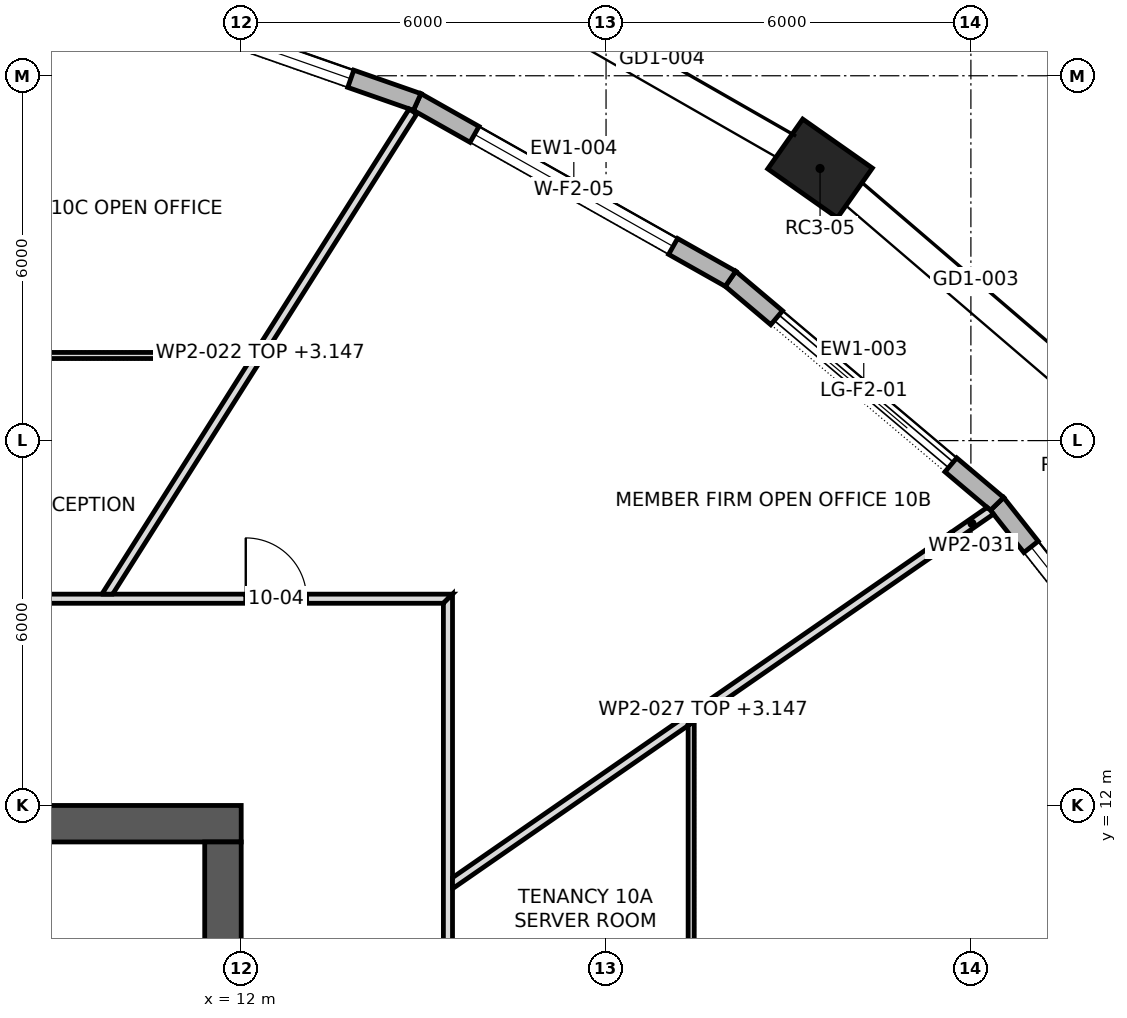
"""IFC4 building model, lengths in metres.
Left out: names, types, materials, properties, quantities, classifications, styles, units other than length and angle.
Written with IfcOpenShell. Run it as: python <this file> out.ifc"""

import sys

from ifc_helpers import new_model, si_unit, direction, frame, frame_2d, origin, origin_2d, place, context, subcontext, project, spatial, polyline, rectangle, outline, extrude, element, fill, save


model = new_model("IFC4")
c1 = context("Model", 3, precision=1e-05, world=origin(), true_north=direction((0.0, 1.0)))
c2 = subcontext(c1, "Body", "Model", "MODEL_VIEW")
j1 = project(units=[si_unit("LENGTHUNIT", "METRE"), si_unit("PLANEANGLEUNIT", "RADIAN")], contexts=[c1])
p1 = place(None, origin())
s1 = spatial("IfcSite", under=j1, at=p1, CompositionType="ELEMENT")
p2 = place(p1, origin())
s2 = spatial("IfcBuilding", under=s1, at=p2, CompositionType="ELEMENT")
p3 = place(p2, frame((0.0, 0.0, 150.7)))
s3 = spatial("IfcBuildingStorey", under=s2, at=p3, CompositionType="ELEMENT", Elevation=150.7)
p4 = place(p3, frame((21.519, 22.475, 0.0), z_axis=(0.0, 0.0, 1.0), x_axis=(-0.817910796357, 0.575345052297, 0.0)))
e1 = element("IfcColumn", 1, at=p4, inside=s3, PredefinedType="COLUMN", context=c2, shape_type="SweptSolid", body=[
    extrude(rectangle(XDim=1.4, YDim=1.0, at=origin_2d()), origin(), (0.0, 0.0, 1.0), 4.2),
])
p5 = place(p3, frame((-12.0, 11.7, 0.0), z_axis=(0.0, 0.0, 1.0), x_axis=(1.0, 0.0, 0.0)))
e2 = element("IfcWall", 2, at=p5, inside=s3, PredefinedType="SHEAR", context=c2, shape_type="SweptSolid", body=[
    extrude(rectangle(XDim=24.0, YDim=0.6, at=frame_2d((12.0, 0.0))), origin(), (0.0, 0.0, 1.0), 4.2),
])
p6 = place(p5, frame((9.225, 0.0, 0.0)))
e3 = element("IfcOpeningElement", 3, at=p6, cuts=e2, PredefinedType="OPENING", context=c2, shape_type="SweptSolid", body=[
    extrude(rectangle(XDim=0.9, YDim=2.1, at=frame_2d((0.45, 1.05))), frame((0.0, 0.312, 0.0), z_axis=(0.0, -1.0, 0.0), x_axis=(1.0, 0.0, 0.0)), (0.0, 0.0, 1.0), 0.624),
])
p7 = place(p5, frame((10.925, 0.0, 0.0)))
e4 = element("IfcOpeningElement", 4, at=p7, cuts=e2, PredefinedType="OPENING", context=c2, shape_type="SweptSolid", body=[
    extrude(rectangle(XDim=0.8, YDim=2.1, at=frame_2d((0.4, 1.05))), frame((0.0, 0.312, 0.0), z_axis=(0.0, -1.0, 0.0), x_axis=(1.0, 0.0, 0.0)), (0.0, 0.0, 1.0), 0.624),
])
p8 = place(p5, frame((4.2, 0.0, 0.0)))
e5 = element("IfcOpeningElement", 5, at=p8, cuts=e2, PredefinedType="OPENING", context=c2, shape_type="SweptSolid", body=[
    extrude(rectangle(XDim=0.8, YDim=2.1, at=frame_2d((0.4, 1.05))), frame((0.0, 0.312, 0.0), z_axis=(0.0, -1.0, 0.0), x_axis=(1.0, 0.0, 0.0)), (0.0, 0.0, 1.0), 0.624),
])
p9 = place(p5, frame((13.8, 0.0, 0.0)))
e6 = element("IfcOpeningElement", 6, at=p9, cuts=e2, PredefinedType="OPENING", context=c2, shape_type="SweptSolid", body=[
    extrude(rectangle(XDim=0.8, YDim=2.1, at=frame_2d((0.4, 1.05))), frame((0.0, 0.312, 0.0), z_axis=(0.0, -1.0, 0.0), x_axis=(1.0, 0.0, 0.0)), (0.0, 0.0, 1.0), 0.624),
])
p10 = place(p5, frame((16.6, 0.0, 0.0)))
e7 = element("IfcOpeningElement", 7, at=p10, cuts=e2, PredefinedType="OPENING", context=c2, shape_type="SweptSolid", body=[
    extrude(rectangle(XDim=0.8, YDim=2.1, at=frame_2d((0.4, 1.05))), frame((0.0, 0.312, 0.0), z_axis=(0.0, -1.0, 0.0), x_axis=(1.0, 0.0, 0.0)), (0.0, 0.0, 1.0), 0.624),
])
p11 = place(p3, frame((11.7, -11.4, 0.0), z_axis=(0.0, 0.0, 1.0), x_axis=(0.0, 1.0, 0.0)))
e8 = element("IfcWall", 8, at=p11, inside=s3, PredefinedType="SHEAR", context=c2, shape_type="SweptSolid", body=[
    extrude(rectangle(XDim=22.8, YDim=0.6, at=frame_2d((11.4, 0.0))), origin(), (0.0, 0.0, 1.0), 4.2),
])
p12 = place(p11, frame((10.2, 0.0, 0.0)))
e9 = element("IfcOpeningElement", 9, at=p12, cuts=e8, PredefinedType="OPENING", context=c2, shape_type="SweptSolid", body=[
    extrude(rectangle(XDim=2.4, YDim=2.1, at=frame_2d((1.2, 1.05))), frame((0.0, 0.312, 0.0), z_axis=(0.0, -1.0, 0.0), x_axis=(1.0, 0.0, 0.0)), (0.0, 0.0, 1.0), 0.624),
])
p13 = place(p11, frame((19.5, 0.0, 0.0)))
e10 = element("IfcOpeningElement", 10, at=p13, cuts=e8, PredefinedType="OPENING", context=c2, shape_type="SweptSolid", body=[
    extrude(rectangle(XDim=1.2, YDim=2.1, at=frame_2d((0.6, 1.05))), frame((0.0, 0.312, 0.0), z_axis=(0.0, -1.0, 0.0), x_axis=(1.0, 0.0, 0.0)), (0.0, 0.0, 1.0), 0.624),
])
p14 = place(p11, frame((2.1, 0.0, 0.0)))
e11 = element("IfcOpeningElement", 11, at=p14, cuts=e8, PredefinedType="OPENING", context=c2, shape_type="SweptSolid", body=[
    extrude(rectangle(XDim=1.2, YDim=2.1, at=frame_2d((0.6, 1.05))), frame((0.0, 0.312, 0.0), z_axis=(0.0, -1.0, 0.0), x_axis=(1.0, 0.0, 0.0)), (0.0, 0.0, 1.0), 0.624),
])
p15 = place(p3, frame((27.876, 12.605, 0.0), z_axis=(0.0, 0.0, 1.0), x_axis=(-0.620520511988, 0.784190215574, 0.0)))
e12 = element("IfcWall", 12, at=p15, inside=s3, PredefinedType="STANDARD", context=c2, shape_type="SweptSolid", body=[
    extrude(outline(polyline([(-0.016, -0.15), (5.569, -0.15), (5.538, 0.15), (0.016, 0.15), (-0.016, -0.15)])), origin(), (0.0, 0.0, 1.0), 3.9),
])
p16 = place(p15, frame((0.902, 0.0, 0.6)))
e13 = element("IfcOpeningElement", 13, at=p16, cuts=e12, PredefinedType="OPENING", context=c2, shape_type="SweptSolid", body=[
    extrude(rectangle(XDim=3.75, YDim=2.85, at=frame_2d((1.875, 1.425))), frame((0.0, 0.162, 0.0), z_axis=(0.0, -1.0, 0.0), x_axis=(1.0, 0.0, 0.0)), (0.0, 0.0, 1.0), 0.324),
])
p17 = place(p3, frame((24.43, 16.96, 0.0), z_axis=(0.0, 0.0, 1.0), x_axis=(-0.764047627809, 0.64515984255, 0.0)))
e14 = element("IfcWall", 14, at=p17, inside=s3, PredefinedType="STANDARD", context=c2, shape_type="SweptSolid", body=[
    extrude(outline(polyline([(-0.015, -0.15), (5.752, -0.15), (5.723, 0.15), (0.015, 0.15), (-0.015, -0.15)])), origin(), (0.0, 0.0, 1.0), 3.9),
])
p18 = place(p17, frame((0.994, 0.0, 0.0)))
e15 = element("IfcOpeningElement", 15, at=p18, cuts=e14, PredefinedType="OPENING", context=c2, shape_type="SweptSolid", body=[
    extrude(rectangle(XDim=3.75, YDim=3.45, at=frame_2d((1.875, 1.725))), frame((0.0, 0.162, 0.0), z_axis=(0.0, -1.0, 0.0), x_axis=(1.0, 0.0, 0.0)), (0.0, 0.0, 1.0), 0.324),
])
p19 = place(p3, frame((20.046, 20.661, 0.0), z_axis=(0.0, 0.0, 1.0), x_axis=(-0.870912346166, 0.491438384028, 0.0)))
e16 = element("IfcWall", 16, at=p19, inside=s3, PredefinedType="STANDARD", context=c2, shape_type="SweptSolid", body=[
    extrude(outline(polyline([(-0.014, -0.15), (5.929, -0.15), (5.902, 0.15), (0.014, 0.15), (-0.014, -0.15)])), origin(), (0.0, 0.0, 1.0), 3.9),
])
p20 = place(p19, frame((1.083, 0.0, 0.6)))
e17 = element("IfcOpeningElement", 17, at=p20, cuts=e16, PredefinedType="OPENING", context=c2, shape_type="SweptSolid", body=[
    extrude(rectangle(XDim=3.75, YDim=2.85, at=frame_2d((1.875, 1.425))), frame((0.0, 0.162, 0.0), z_axis=(0.0, -1.0, 0.0), x_axis=(1.0, 0.0, 0.0)), (0.0, 0.0, 1.0), 0.324),
])
p21 = place(p3, frame((14.894, 23.569, 0.0), z_axis=(0.0, 0.0, 1.0), x_axis=(-0.943925510212, 0.330158494016, 0.0)))
e18 = element("IfcWall", 18, at=p21, inside=s3, PredefinedType="STANDARD", context=c2, shape_type="SweptSolid", body=[
    extrude(outline(polyline([(-0.013, -0.15), (6.076, -0.15), (6.05, 0.15), (0.013, 0.15), (-0.013, -0.15)])), origin(), (0.0, 0.0, 1.0), 3.9),
])
p22 = place(p21, frame((1.156, 0.0, 0.6)))
e19 = element("IfcOpeningElement", 19, at=p22, cuts=e18, PredefinedType="OPENING", context=c2, shape_type="SweptSolid", body=[
    extrude(rectangle(XDim=3.75, YDim=2.85, at=frame_2d((1.875, 1.425))), frame((0.0, 0.162, 0.0), z_axis=(0.0, -1.0, 0.0), x_axis=(1.0, 0.0, 0.0)), (0.0, 0.0, 1.0), 0.324),
])
p23 = place(p3, frame((-15.475, 15.4, 0.0), z_axis=(0.0, 0.0, 1.0), x_axis=(1.0, 0.0, 0.0)))
e20 = element("IfcWall", 20, at=p23, inside=s3, PredefinedType="PARTITIONING", context=c2, shape_type="SweptSolid", body=[
    extrude(outline(polyline([(0.15, -0.075), (2.066, -0.075), (3.981, -0.075), (5.897, -0.075), (7.812, -0.075), (9.728, -0.075), (11.644, -0.075), (13.56, -0.075), (15.475, -0.075), (17.391, -0.075), (19.306, -0.075), (21.222, -0.075), (23.138, -0.075), (25.053, -0.075), (26.969, -0.075), (28.885, -0.075), (30.8, -0.075), (30.95, 0.075), (29.016, 0.075), (27.081, 0.075), (25.147, 0.075), (23.212, 0.075), (21.278, 0.075), (19.344, 0.075), (17.409, 0.075), (15.475, 0.075), (13.541, 0.075), (11.606, 0.075), (9.672, 0.075), (7.738, 0.075), (5.803, 0.075), (3.869, 0.075), (1.935, 0.075), (0.0, 0.075), (0.15, -0.075)])), origin(), (0.0, 0.0, 1.0), 3.9),
])
p24 = place(p23, frame((27.55, 0.0, 0.0)))
e21 = element("IfcOpeningElement", 21, at=p24, cuts=e20, PredefinedType="OPENING", context=c2, shape_type="SweptSolid", body=[
    extrude(rectangle(XDim=1.0, YDim=2.1, at=frame_2d((0.5, 1.05))), frame((0.0, 0.087, 0.0), z_axis=(0.0, -1.0, 0.0), x_axis=(1.0, 0.0, 0.0)), (0.0, 0.0, 1.0), 0.174),
])
p25 = place(p23, frame((20.75, 0.0, 0.0)))
e22 = element("IfcOpeningElement", 22, at=p25, cuts=e20, PredefinedType="OPENING", context=c2, shape_type="SweptSolid", body=[
    extrude(rectangle(XDim=1.0, YDim=2.1, at=frame_2d((0.5, 1.05))), frame((0.0, 0.087, 0.0), z_axis=(0.0, -1.0, 0.0), x_axis=(1.0, 0.0, 0.0)), (0.0, 0.0, 1.0), 0.174),
])
p26 = place(p23, frame((13.11, 0.0, 0.0)))
e23 = element("IfcOpeningElement", 23, at=p26, cuts=e20, PredefinedType="OPENING", context=c2, shape_type="SweptSolid", body=[
    extrude(rectangle(XDim=1.0, YDim=2.1, at=frame_2d((0.5, 1.05))), frame((0.0, 0.087, 0.0), z_axis=(0.0, -1.0, 0.0), x_axis=(1.0, 0.0, 0.0)), (0.0, 0.0, 1.0), 0.174),
])
p27 = place(p23, frame((4.725, 0.0, 0.0)))
e24 = element("IfcOpeningElement", 24, at=p27, cuts=e20, PredefinedType="OPENING", context=c2, shape_type="SweptSolid", body=[
    extrude(rectangle(XDim=1.0, YDim=2.1, at=frame_2d((0.5, 1.05))), frame((0.0, 0.087, 0.0), z_axis=(0.0, -1.0, 0.0), x_axis=(1.0, 0.0, 0.0)), (0.0, 0.0, 1.0), 0.174),
])
p28 = place(p3, frame((2.34, 19.4, 0.0), z_axis=(0.0, 0.0, 1.0), x_axis=(1.0, 0.0, 0.0)))
e25 = element("IfcWall", 25, at=p28, inside=s3, PredefinedType="PARTITIONING", context=c2, shape_type="SweptSolid", body=[
    extrude(outline(polyline([(0.0, -0.05), (1.965, -0.05), (3.929, -0.05), (5.894, -0.05), (7.858, -0.05), (9.823, -0.05), (9.885, 0.049), (9.885, 0.05), (7.91, 0.05), (5.934, 0.05), (3.958, 0.05), (1.982, 0.05), (0.006, 0.05), (0.011, 0.049), (0.0, -0.046), (0.0, -0.05)])), origin(), (0.0, 0.0, 1.0), 3.9),
])
p29 = place(p28, frame((4.485, 0.0, 0.0)))
e26 = element("IfcOpeningElement", 26, at=p29, cuts=e25, PredefinedType="OPENING", context=c2, shape_type="SweptSolid", body=[
    extrude(rectangle(XDim=0.9, YDim=2.1, at=frame_2d((0.45, 1.05))), frame((0.0, 0.062, 0.0), z_axis=(0.0, -1.0, 0.0), x_axis=(1.0, 0.0, 0.0)), (0.0, 0.0, 1.0), 0.124),
])
p30 = place(p3, frame((9.772, 15.435, 0.0), z_axis=(0.0, 0.0, 1.0), x_axis=(0.535018864906, 0.844840111616, 0.0)))
e27 = element("IfcWall", 27, at=p30, inside=s3, PredefinedType="PARTITIONING", context=c2, shape_type="SweptSolid", body=[
    extrude(outline(polyline([(9.443, 0.075), (7.863, 0.075), (6.283, 0.075), (4.704, 0.075), (4.62, 0.022), (4.586, 0.075), (3.058, 0.075), (1.529, 0.075), (0.0, 0.075), (0.0, 0.075), (0.095, -0.075), (1.964, -0.075), (3.834, -0.075), (5.703, -0.075), (7.573, -0.075), (9.443, -0.075), (9.443, 0.075)])), origin(), (0.0, 0.0, 1.0), 3.147),
])
p31 = place(p3, frame((15.4, -15.475, 0.0), z_axis=(0.0, 0.0, 1.0), x_axis=(0.0, 1.0, 0.0)))
e28 = element("IfcWall", 28, at=p31, inside=s3, PredefinedType="PARTITIONING", context=c2, shape_type="SweptSolid", body=[
    extrude(outline(polyline([(0.0, -0.075), (1.935, -0.075), (3.869, -0.075), (5.803, -0.075), (7.738, -0.075), (9.672, -0.075), (11.606, -0.075), (13.541, -0.075), (15.475, -0.075), (17.409, -0.075), (19.344, -0.075), (21.278, -0.075), (23.212, -0.075), (25.147, -0.075), (27.081, -0.075), (29.016, -0.075), (30.95, -0.075), (30.8, 0.075), (28.885, 0.075), (26.969, 0.075), (25.053, 0.075), (23.138, 0.075), (21.222, 0.075), (19.306, 0.075), (17.391, 0.075), (15.475, 0.075), (13.56, 0.075), (11.644, 0.075), (9.728, 0.075), (7.812, 0.075), (5.897, 0.075), (3.981, 0.075), (2.066, 0.075), (0.15, 0.075), (0.0, -0.075)])), origin(), (0.0, 0.0, 1.0), 3.9),
])
p32 = place(p31, frame((10.15, 0.0, 0.0)))
e29 = element("IfcOpeningElement", 29, at=p32, cuts=e28, PredefinedType="OPENING", context=c2, shape_type="SweptSolid", body=[
    extrude(rectangle(XDim=1.0, YDim=2.1, at=frame_2d((0.5, 1.05))), frame((0.0, 0.087, 0.0), z_axis=(0.0, -1.0, 0.0), x_axis=(1.0, 0.0, 0.0)), (0.0, 0.0, 1.0), 0.174),
])
p33 = place(p31, frame((16.835, 0.0, 0.0)))
e30 = element("IfcOpeningElement", 30, at=p33, cuts=e28, PredefinedType="OPENING", context=c2, shape_type="SweptSolid", body=[
    extrude(rectangle(XDim=1.0, YDim=2.1, at=frame_2d((0.5, 1.05))), frame((0.0, 0.087, 0.0), z_axis=(0.0, -1.0, 0.0), x_axis=(1.0, 0.0, 0.0)), (0.0, 0.0, 1.0), 0.174),
])
p34 = place(p31, frame((23.52, 0.0, 0.0)))
e31 = element("IfcOpeningElement", 31, at=p34, cuts=e28, PredefinedType="OPENING", context=c2, shape_type="SweptSolid", body=[
    extrude(rectangle(XDim=1.0, YDim=2.1, at=frame_2d((0.5, 1.05))), frame((0.0, 0.087, 0.0), z_axis=(0.0, -1.0, 0.0), x_axis=(1.0, 0.0, 0.0)), (0.0, 0.0, 1.0), 0.174),
])
p35 = place(p3, frame((15.433, 10.692, 0.0), z_axis=(0.0, 0.0, 1.0), x_axis=(0.822108408401, 0.569330980042, 0.0)))
e32 = element("IfcWall", 32, at=p35, inside=s3, PredefinedType="PARTITIONING", context=c2, shape_type="SweptSolid", body=[
    extrude(outline(polyline([(0.0, -0.075), (1.571, -0.075), (3.142, -0.075), (4.713, -0.075), (4.715, -0.072), (4.719, -0.075), (6.503, -0.075), (8.288, -0.075), (10.072, -0.075), (10.072, 0.075), (8.078, 0.075), (6.084, 0.075), (4.091, 0.075), (2.097, 0.075), (0.104, 0.075), (0.0, -0.074), (0.0, -0.075)])), origin(), (0.0, 0.0, 1.0), 3.147),
])
p36 = place(p3, frame((19.4, -8.697, 0.0), z_axis=(0.0, 0.0, 1.0), x_axis=(0.0, 1.0, 0.0)))
e33 = element("IfcWall", 33, at=p36, inside=s3, PredefinedType="PARTITIONING", context=c2, shape_type="SweptSolid", body=[
    extrude(outline(polyline([(22.08, -0.05), (22.08, -0.05), (22.01, 0.05), (20.3, 0.05), (18.589, 0.05), (16.877, 0.05), (15.167, 0.05), (15.167, 0.05), (15.067, 0.05), (15.067, 0.05), (13.262, 0.05), (11.458, 0.05), (9.655, 0.05), (7.851, 0.05), (6.047, 0.05), (6.047, 0.05), (5.947, 0.05), (5.947, 0.05), (3.979, 0.05), (2.012, 0.05), (0.045, 0.05), (0.0, -0.049), (0.0, -0.05), (1.84, -0.05), (3.68, -0.05), (5.52, -0.05), (7.36, -0.05), (9.2, -0.05), (11.04, -0.05), (12.88, -0.05), (14.72, -0.05), (16.56, -0.05), (18.4, -0.05), (20.24, -0.05), (22.08, -0.05)])), origin(), (0.0, 0.0, 1.0), 3.9),
])
p37 = place(p36, frame((7.701, 0.0, 0.0)))
e34 = element("IfcOpeningElement", 34, at=p37, cuts=e33, PredefinedType="OPENING", context=c2, shape_type="SweptSolid", body=[
    extrude(rectangle(XDim=0.9, YDim=2.1, at=frame_2d((0.45, 1.05))), frame((0.0, 0.062, 0.0), z_axis=(0.0, -1.0, 0.0), x_axis=(1.0, 0.0, 0.0)), (0.0, 0.0, 1.0), 0.124),
])
p38 = place(p3, frame((23.713, 16.427, 0.0), z_axis=(0.0, 0.0, 1.0), x_axis=(0.822145264982, 0.569277755816, 0.0)))
e35 = element("IfcWall", 35, at=p38, inside=s3, PredefinedType="PARTITIONING", context=c2, shape_type="SweptSolid", body=[
    extrude(outline(polyline([(0.749, -0.075), (0.749, -0.072), (0.744, 0.006), (0.726, 0.075), (0.0, 0.075), (0.0, -0.075), (0.749, -0.075)])), origin(), (0.0, 0.0, 1.0), 3.9),
])
p39 = place(p16, origin())
e36 = element("IfcWindow", 36, at=p39, inside=s3, PartitioningType="TRIPLE_PANEL_VERTICAL", PredefinedType="WINDOW", context=c2, shape_type="SweptSolid", body=[
    extrude(rectangle(XDim=3.75, YDim=2.85, at=frame_2d((1.875, 1.425))), frame((0.0, 0.03, 0.0), z_axis=(0.0, -1.0, 0.0), x_axis=(1.0, 0.0, 0.0)), (0.0, 0.0, 1.0), 0.06),
])
fill(e13, e36)
p40 = place(p18, origin())
e37 = element("IfcDoor", 37, at=p40, inside=s3, OperationType="DOUBLE_DOOR_SLIDING", PredefinedType="DOOR", context=c2, shape_type="SweptSolid", body=[
    extrude(rectangle(XDim=3.75, YDim=3.45, at=frame_2d((1.875, 1.725))), frame((0.0, 0.025, 0.0), z_axis=(0.0, -1.0, 0.0), x_axis=(1.0, 0.0, 0.0)), (0.0, 0.0, 1.0), 0.05),
])
fill(e15, e37)
p41 = place(p20, origin())
e38 = element("IfcWindow", 38, at=p41, inside=s3, PartitioningType="TRIPLE_PANEL_VERTICAL", PredefinedType="WINDOW", context=c2, shape_type="SweptSolid", body=[
    extrude(rectangle(XDim=3.75, YDim=2.85, at=frame_2d((1.875, 1.425))), frame((0.0, 0.03, 0.0), z_axis=(0.0, -1.0, 0.0), x_axis=(1.0, 0.0, 0.0)), (0.0, 0.0, 1.0), 0.06),
])
fill(e17, e38)
p42 = place(p22, origin())
e39 = element("IfcWindow", 39, at=p42, inside=s3, PartitioningType="TRIPLE_PANEL_VERTICAL", PredefinedType="WINDOW", context=c2, shape_type="SweptSolid", body=[
    extrude(rectangle(XDim=3.75, YDim=2.85, at=frame_2d((1.875, 1.425))), frame((0.0, 0.03, 0.0), z_axis=(0.0, -1.0, 0.0), x_axis=(1.0, 0.0, 0.0)), (0.0, 0.0, 1.0), 0.06),
])
fill(e19, e39)
p43 = place(p24, origin())
e40 = element("IfcDoor", 40, at=p43, inside=s3, OperationType="SINGLE_SWING_RIGHT", PredefinedType="DOOR", context=c2, shape_type="SweptSolid", body=[
    extrude(rectangle(XDim=1.0, YDim=2.1, at=frame_2d((0.5, 1.05))), frame((0.0, 0.025, 0.0), z_axis=(0.0, -1.0, 0.0), x_axis=(1.0, 0.0, 0.0)), (0.0, 0.0, 1.0), 0.05),
])
fill(e21, e40)
save(model, sys.argv[1])
